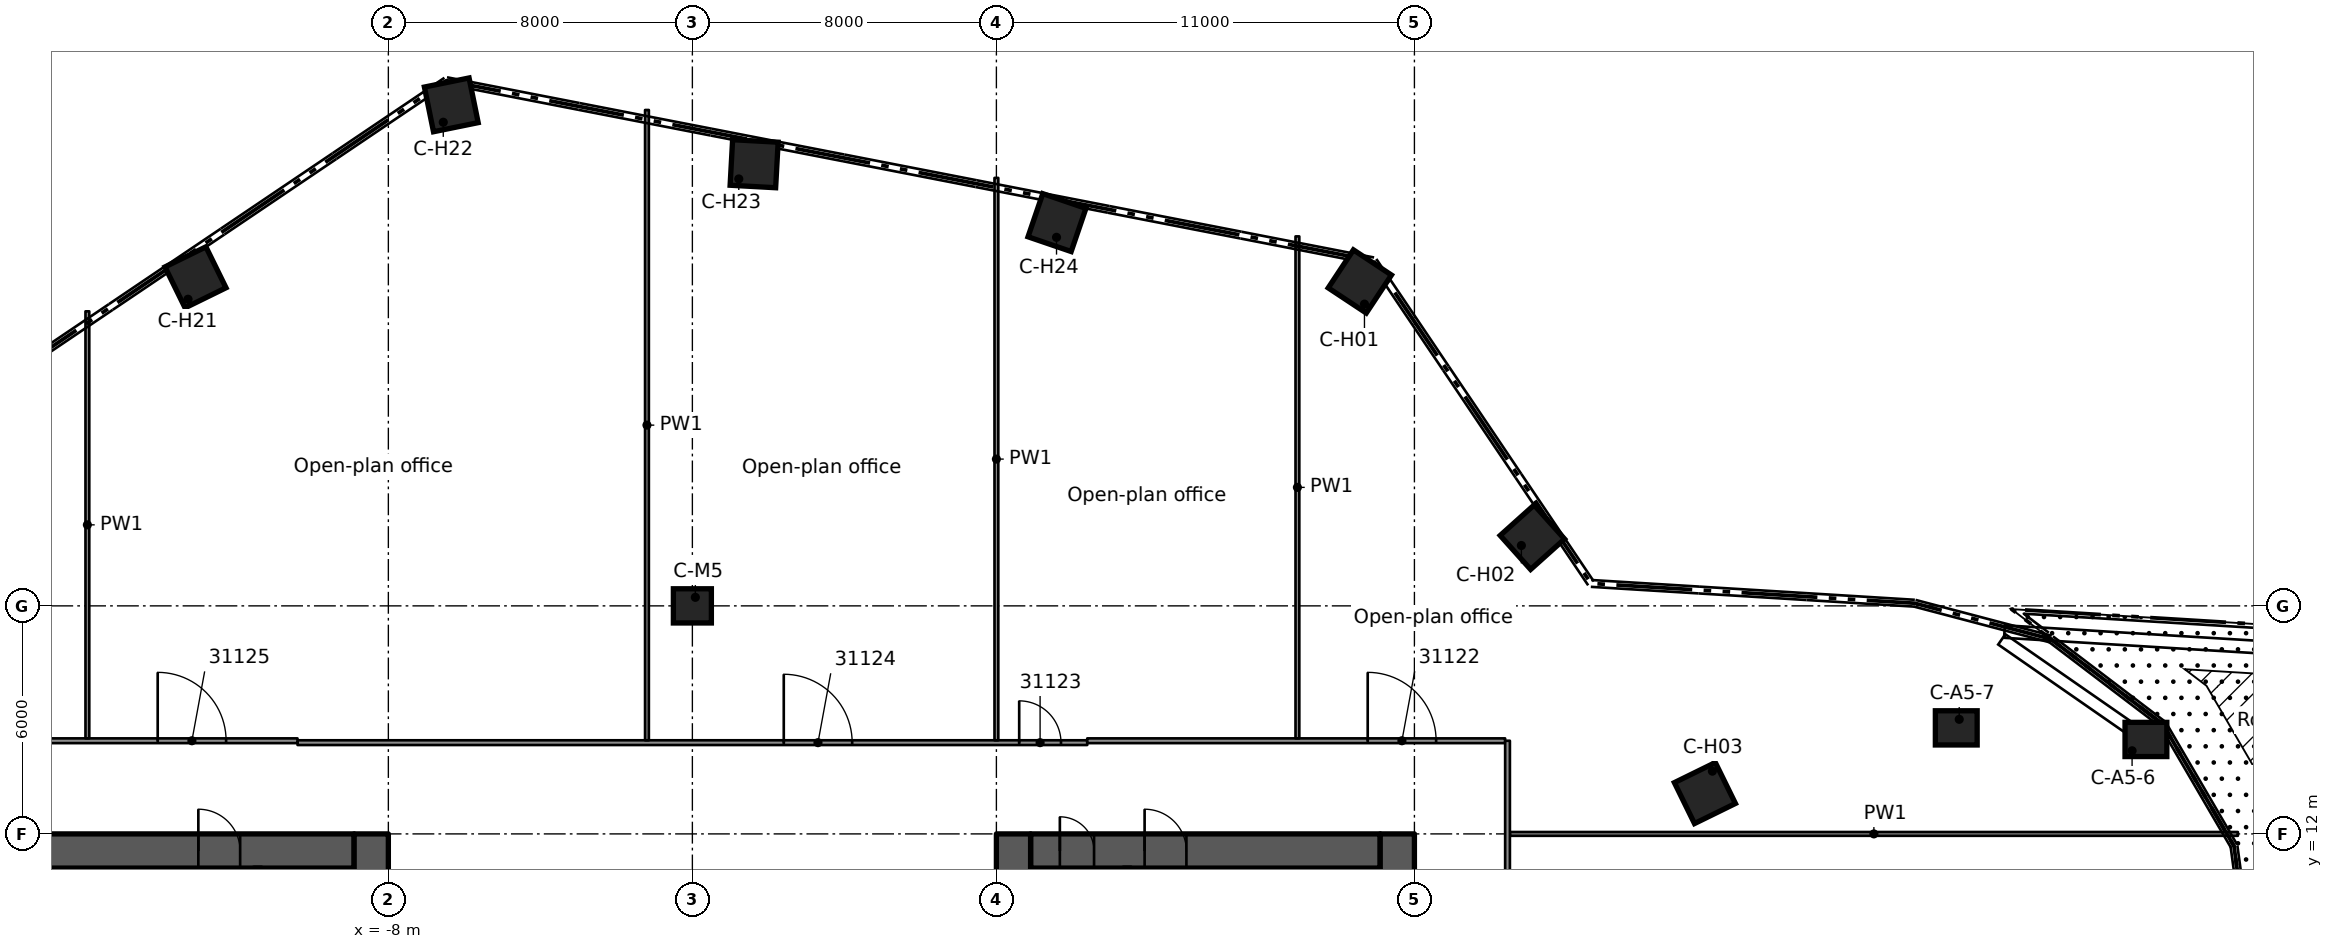
"""IFC4 building model, lengths in metres.
Left out: names, types, materials, properties, quantities, classifications, styles, units other than length and angle.
Written with IfcOpenShell. Run it as: python <this file> out.ifc"""

import sys

from ifc_helpers import new_model, si_unit, direction, frame, frame_2d, origin, origin_2d, place, context, subcontext, project, spatial, rectangle, extrude, element, fill, save


model = new_model("IFC4")
c1 = context("Model", 3, precision=1e-05, world=origin(), true_north=direction((0.0, 1.0)))
c2 = subcontext(c1, "Body", "Model", "MODEL_VIEW")
j1 = project(units=[si_unit("LENGTHUNIT", "METRE"), si_unit("PLANEANGLEUNIT", "RADIAN")], contexts=[c1])
p1 = place(None, origin())
s1 = spatial("IfcSite", under=j1, at=p1, CompositionType="ELEMENT")
p2 = place(p1, origin())
s2 = spatial("IfcBuilding", under=s1, at=p2, CompositionType="ELEMENT")
p3 = place(p2, frame((0.0, 0.0, 156.1)))
s3 = spatial("IfcBuildingStorey", under=s2, at=p3, CompositionType="ELEMENT", Elevation=156.1)
p4 = place(p3, frame((-18.1, 11.55, 0.0), z_axis=(0.0, 0.0, 1.0), x_axis=(1.0, 0.0, 0.0)))
e1 = element("IfcWall", 1, at=p4, inside=s3, PredefinedType="SHEAR", context=c2, shape_type="SweptSolid", body=[
    extrude(rectangle(XDim=9.2, YDim=0.9, at=frame_2d((4.6, 0.0))), origin(), (0.0, 0.0, 1.0), 3.5),
])
p5 = place(p4, frame((5.1, 0.0, 0.0)))
e2 = element("IfcOpeningElement", 2, at=p5, cuts=e1, PredefinedType="OPENING", context=c2, shape_type="SweptSolid", body=[
    extrude(rectangle(XDim=1.1, YDim=2.1, at=frame_2d((0.55, 1.05))), frame((0.0, 0.46, 0.0), z_axis=(0.0, -1.0, 0.0), x_axis=(1.0, 0.0, 0.0)), (0.0, 0.0, 1.0), 0.92),
])
p6 = place(p3, frame((-8.45, -12.0, 0.0), z_axis=(0.0, 0.0, 1.0), x_axis=(0.0, 1.0, 0.0)))
e3 = element("IfcWall", 3, at=p6, inside=s3, PredefinedType="SHEAR", context=c2, shape_type="SweptSolid", body=[
    extrude(rectangle(XDim=24.0, YDim=0.9, at=frame_2d((12.0, 0.0))), origin(), (0.0, 0.0, 1.0), 3.5),
])
p7 = place(p6, frame((9.6, 0.0, 0.0)))
e4 = element("IfcOpeningElement", 4, at=p7, cuts=e3, PredefinedType="OPENING", context=c2, shape_type="SweptSolid", body=[
    extrude(rectangle(XDim=1.8, YDim=2.1, at=frame_2d((0.9, 1.05))), frame((0.0, 0.46, 0.0), z_axis=(0.0, -1.0, 0.0), x_axis=(1.0, 0.0, 0.0)), (0.0, 0.0, 1.0), 0.92),
])
p8 = place(p6, frame((19.65, 0.0, 0.0)))
e5 = element("IfcOpeningElement", 5, at=p8, cuts=e3, PredefinedType="OPENING", context=c2, shape_type="SweptSolid", body=[
    extrude(rectangle(XDim=1.1, YDim=2.1, at=frame_2d((0.55, 1.05))), frame((0.0, 0.46, 0.0), z_axis=(0.0, -1.0, 0.0), x_axis=(1.0, 0.0, 0.0)), (0.0, 0.0, 1.0), 0.92),
])
p9 = place(p6, frame((2.2, 0.0, 0.0)))
e6 = element("IfcOpeningElement", 6, at=p9, cuts=e3, PredefinedType="OPENING", context=c2, shape_type="SweptSolid", body=[
    extrude(rectangle(XDim=0.8, YDim=2.1, at=frame_2d((0.4, 1.05))), frame((0.0, 0.46, 0.0), z_axis=(0.0, -1.0, 0.0), x_axis=(1.0, 0.0, 0.0)), (0.0, 0.0, 1.0), 0.92),
])
p10 = place(p3, frame((8.9, 11.55, 0.0), z_axis=(0.0, 0.0, 1.0), x_axis=(1.0, 0.0, 0.0)))
e7 = element("IfcWall", 7, at=p10, inside=s3, PredefinedType="SHEAR", context=c2, shape_type="SweptSolid", body=[
    extrude(rectangle(XDim=9.2, YDim=0.9, at=frame_2d((4.6, 0.0))), origin(), (0.0, 0.0, 1.0), 3.5),
])
p11 = place(p10, frame((3.0, 0.0, 0.0)))
e8 = element("IfcOpeningElement", 8, at=p11, cuts=e7, PredefinedType="OPENING", context=c2, shape_type="SweptSolid", body=[
    extrude(rectangle(XDim=1.1, YDim=2.1, at=frame_2d((0.55, 1.05))), frame((0.0, 0.46, 0.0), z_axis=(0.0, -1.0, 0.0), x_axis=(1.0, 0.0, 0.0)), (0.0, 0.0, 1.0), 0.92),
])
p12 = place(p10, frame((0.77, 0.0, 0.0)))
e9 = element("IfcOpeningElement", 9, at=p12, cuts=e7, PredefinedType="OPENING", context=c2, shape_type="SweptSolid", body=[
    extrude(rectangle(XDim=0.9, YDim=2.1, at=frame_2d((0.45, 1.05))), frame((0.0, 0.46, 0.0), z_axis=(0.0, -1.0, 0.0), x_axis=(1.0, 0.0, 0.0)), (0.0, 0.0, 1.0), 0.92),
])
p13 = place(p3, frame((8.45, -12.0, 0.0), z_axis=(0.0, 0.0, 1.0), x_axis=(0.0, 1.0, 0.0)))
e10 = element("IfcWall", 10, at=p13, inside=s3, PredefinedType="SHEAR", context=c2, shape_type="SweptSolid", body=[
    extrude(rectangle(XDim=24.0, YDim=0.9, at=frame_2d((12.0, 0.0))), origin(), (0.0, 0.0, 1.0), 3.5),
])
p14 = place(p13, frame((12.6, 0.0, 0.0)))
e11 = element("IfcOpeningElement", 11, at=p14, cuts=e10, PredefinedType="OPENING", context=c2, shape_type="SweptSolid", body=[
    extrude(rectangle(XDim=1.8, YDim=2.1, at=frame_2d((0.9, 1.05))), frame((0.0, 0.46, 0.0), z_axis=(0.0, -1.0, 0.0), x_axis=(1.0, 0.0, 0.0)), (0.0, 0.0, 1.0), 0.92),
])
p15 = place(p13, frame((3.25, 0.0, 0.0)))
e12 = element("IfcOpeningElement", 12, at=p15, cuts=e10, PredefinedType="OPENING", context=c2, shape_type="SweptSolid", body=[
    extrude(rectangle(XDim=1.1, YDim=2.1, at=frame_2d((0.55, 1.05))), frame((0.0, 0.46, 0.0), z_axis=(0.0, -1.0, 0.0), x_axis=(1.0, 0.0, 0.0)), (0.0, 0.0, 1.0), 0.92),
])
p16 = place(p13, frame((21.0, 0.0, 0.0)))
e13 = element("IfcOpeningElement", 13, at=p16, cuts=e10, PredefinedType="OPENING", context=c2, shape_type="SweptSolid", body=[
    extrude(rectangle(XDim=0.8, YDim=2.1, at=frame_2d((0.4, 1.05))), frame((0.0, 0.46, 0.0), z_axis=(0.0, -1.0, 0.0), x_axis=(1.0, 0.0, 0.0)), (0.0, 0.0, 1.0), 0.92),
])
p17 = place(p3, frame((18.55, -12.0, 0.0), z_axis=(0.0, 0.0, 1.0), x_axis=(0.0, 1.0, 0.0)))
e14 = element("IfcWall", 14, at=p17, inside=s3, PredefinedType="SHEAR", context=c2, shape_type="SweptSolid", body=[
    extrude(rectangle(XDim=24.0, YDim=0.9, at=frame_2d((12.0, 0.0))), origin(), (0.0, 0.0, 1.0), 3.5),
])
p18 = place(p17, frame((12.1, 0.0, 0.0)))
e15 = element("IfcOpeningElement", 15, at=p18, cuts=e14, PredefinedType="OPENING", context=c2, shape_type="SweptSolid", body=[
    extrude(rectangle(XDim=1.8, YDim=2.1, at=frame_2d((0.9, 1.05))), frame((0.0, 0.46, 0.0), z_axis=(0.0, -1.0, 0.0), x_axis=(1.0, 0.0, 0.0)), (0.0, 0.0, 1.0), 0.92),
])
for number, where, z_axis, x_axis in (
    (16, (38.249, 14.485, 0.0), (0.0, 0.0, 1.0), (1.0, 0.0, 0.0)),
    (17, (33.258, 14.79, 0.0), (0.0, 0.0, 1.0), (1.0, 0.0, 0.0)),
):
    element("IfcColumn", number, at=place(p3, frame(where, z_axis=z_axis, x_axis=x_axis)), inside=s3, PredefinedType="COLUMN", context=c2, shape_type="SweptSolid", body=[
        extrude(rectangle(XDim=1.1, YDim=0.9, at=origin_2d()), origin(), (0.0, 0.0, 1.0), 3.5),
    ])
for number, where, z_axis, x_axis in (
    (18, (17.564, 26.536, 0.0), (0.0, 0.0, 1.0), (0.552, 0.834, 0.0)),
    (19, (22.104, 19.806, 0.0), (0.0, 0.0, 1.0), (0.745, 0.667, 0.0)),
    (20, (26.644, 13.075, 0.0), (0.0, 0.0, 1.0), (0.898, 0.441, 0.0)),
    (21, (-13.075, 26.644, 0.0), (0.0, 0.0, 1.0), (-0.441, 0.898, 0.0)),
    (22, (-6.344, 31.183, 0.0), (0.0, 0.0, 1.0), (-0.199, 0.98, 0.0)),
    (23, (1.625, 29.634, 0.0), (0.0, 0.0, 1.0), (0.055, 0.998, 0.0)),
    (24, (9.594, 28.085, 0.0), (0.0, 0.0, 1.0), (0.323, 0.946, 0.0)),
):
    element("IfcColumn", number, at=place(p3, frame(where, z_axis=z_axis, x_axis=x_axis)), inside=s3, PredefinedType="COLUMN", context=c2, shape_type="SweptSolid", body=[
        extrude(rectangle(XDim=1.2, YDim=1.2, at=origin_2d()), origin(), (0.0, 0.0, 1.0), 3.5),
    ])
p19 = place(p3, frame((0.0, 18.0, 0.0), z_axis=(0.0, 0.0, 1.0), x_axis=(1.0, 0.0, 0.0)))
e25 = element("IfcColumn", 25, at=p19, inside=s3, PredefinedType="COLUMN", context=c2, shape_type="SweptSolid", body=[
    extrude(rectangle(XDim=1.0, YDim=0.9, at=origin_2d()), origin(), (0.0, 0.0, 1.0), 3.5),
])
p20 = place(p3, frame((-11.44, 6.975, 0.0), z_axis=(0.0, 0.0, 1.0), x_axis=(0.0, 1.0, 0.0)))
e26 = element("IfcWall", 26, at=p20, inside=s3, PredefinedType="SOLIDWALL", context=c2, shape_type="SweptSolid", body=[
    extrude(rectangle(XDim=4.125, YDim=0.2, at=frame_2d((2.062, 0.0))), origin(), (0.0, 0.0, 1.0), 3.09),
])
p21 = place(p20, frame((2.1, 0.0, 0.0)))
e27 = element("IfcOpeningElement", 27, at=p21, cuts=e26, PredefinedType="OPENING", context=c2, shape_type="SweptSolid", body=[
    extrude(rectangle(XDim=1.1, YDim=2.1, at=frame_2d((0.55, 1.05))), frame((0.0, 0.11, 0.0), z_axis=(0.0, -1.0, 0.0), x_axis=(1.0, 0.0, 0.0)), (0.0, 0.0, 1.0), 0.22),
])
p22 = place(p3, frame((11.44, 11.1, 0.0), z_axis=(0.0, 0.0, 1.0), x_axis=(0.0, -1.0, 0.0)))
e28 = element("IfcWall", 28, at=p22, inside=s3, PredefinedType="SOLIDWALL", context=c2, shape_type="SweptSolid", body=[
    extrude(rectangle(XDim=4.125, YDim=0.2, at=frame_2d((2.062, 0.0))), origin(), (0.0, 0.0, 1.0), 3.09),
])
p23 = place(p3, frame((21.512, 12.0, 0.0), z_axis=(0.0, 0.0, 1.0), x_axis=(1.0, 0.0, 0.0)))
e29 = element("IfcWall", 29, at=p23, inside=s3, PredefinedType="PARTITIONING", context=c2, shape_type="SweptSolid", body=[
    extrude(rectangle(XDim=19.157, YDim=0.1, at=frame_2d((9.579, 0.0))), origin(), (0.0, 0.0, 1.0), 3.08),
])
p24 = place(p3, frame((-10.39, 14.401, 0.0), z_axis=(0.0, 0.0, 1.0), x_axis=(1.0, 0.0, 0.0)))
e30 = element("IfcWall", 30, at=p24, inside=s3, PredefinedType="PARTITIONING", context=c2, shape_type="SweptSolid", body=[
    extrude(rectangle(XDim=20.781, YDim=0.125, at=frame_2d((10.391, 0.0))), origin(), (0.0, 0.0, 1.0), 3.08),
])
p25 = place(p24, frame((18.99, 0.0, 0.0)))
e31 = element("IfcOpeningElement", 31, at=p25, cuts=e30, PredefinedType="OPENING", context=c2, shape_type="SweptSolid", body=[
    extrude(rectangle(XDim=1.1, YDim=2.1, at=frame_2d((0.55, 1.05))), frame((0.0, 0.073, 0.0), z_axis=(0.0, -1.0, 0.0), x_axis=(1.0, 0.0, 0.0)), (0.0, 0.0, 1.0), 0.145),
])
p26 = place(p24, frame((12.795, 0.0, 0.0)))
e32 = element("IfcOpeningElement", 32, at=p26, cuts=e30, PredefinedType="OPENING", context=c2, shape_type="SweptSolid", body=[
    extrude(rectangle(XDim=1.8, YDim=2.1, at=frame_2d((0.9, 1.05))), frame((0.0, 0.073, 0.0), z_axis=(0.0, -1.0, 0.0), x_axis=(1.0, 0.0, 0.0)), (0.0, 0.0, 1.0), 0.145),
])
p27 = place(p3, frame((-21.387, 14.451, 0.0), z_axis=(0.0, 0.0, 1.0), x_axis=(1.0, 0.0, 0.0)))
e33 = element("IfcWall", 33, at=p27, inside=s3, PredefinedType="PARTITIONING", context=c2, shape_type="SweptSolid", body=[
    extrude(rectangle(XDim=10.996, YDim=0.125, at=frame_2d((5.498, 0.0))), origin(), (0.0, 0.0, 1.0), 3.08),
])
p28 = place(p27, frame((7.317, 0.0, 0.0)))
e34 = element("IfcOpeningElement", 34, at=p28, cuts=e33, PredefinedType="OPENING", context=c2, shape_type="SweptSolid", body=[
    extrude(rectangle(XDim=1.8, YDim=2.1, at=frame_2d((0.9, 1.05))), frame((0.0, 0.073, 0.0), z_axis=(0.0, -1.0, 0.0), x_axis=(1.0, 0.0, 0.0)), (0.0, 0.0, 1.0), 0.145),
])
p29 = place(p3, frame((10.391, 14.451, 0.0), z_axis=(0.0, 0.0, 1.0), x_axis=(1.0, 0.0, 0.0)))
e35 = element("IfcWall", 35, at=p29, inside=s3, PredefinedType="PARTITIONING", context=c2, shape_type="SweptSolid", body=[
    extrude(rectangle(XDim=10.996, YDim=0.125, at=frame_2d((5.498, 0.0))), origin(), (0.0, 0.0, 1.0), 3.08),
])
p30 = place(p29, frame((7.38, 0.0, 0.0)))
e36 = element("IfcOpeningElement", 36, at=p30, cuts=e35, PredefinedType="OPENING", context=c2, shape_type="SweptSolid", body=[
    extrude(rectangle(XDim=1.8, YDim=2.1, at=frame_2d((0.9, 1.05))), frame((0.0, 0.073, 0.0), z_axis=(0.0, -1.0, 0.0), x_axis=(1.0, 0.0, 0.0)), (0.0, 0.0, 1.0), 0.145),
])
p31 = place(p3, frame((21.45, 14.451, 0.0), z_axis=(0.0, 0.0, 1.0), x_axis=(0.0, -1.0, 0.0)))
e37 = element("IfcWall", 37, at=p31, inside=s3, PredefinedType="PARTITIONING", context=c2, shape_type="SweptSolid", body=[
    extrude(rectangle(XDim=28.902, YDim=0.125, at=frame_2d((14.451, 0.0))), origin(), (0.0, 0.0, 1.0), 3.08),
])
p32 = place(p31, frame((25.137, 0.0, 0.0)))
e38 = element("IfcOpeningElement", 38, at=p32, cuts=e37, PredefinedType="OPENING", context=c2, shape_type="SweptSolid", body=[
    extrude(rectangle(XDim=0.9, YDim=2.1, at=frame_2d((0.45, 1.05))), frame((0.0, 0.073, 0.0), z_axis=(0.0, -1.0, 0.0), x_axis=(1.0, 0.0, 0.0)), (0.0, 0.0, 1.0), 0.145),
])
p33 = place(p31, frame((18.025, 0.0, 0.0)))
e39 = element("IfcOpeningElement", 39, at=p33, cuts=e37, PredefinedType="OPENING", context=c2, shape_type="SweptSolid", body=[
    extrude(rectangle(XDim=1.8, YDim=2.1, at=frame_2d((0.9, 1.05))), frame((0.0, 0.073, 0.0), z_axis=(0.0, -1.0, 0.0), x_axis=(1.0, 0.0, 0.0)), (0.0, 0.0, 1.0), 0.145),
])
p34 = place(p31, frame((11.413, 0.0, 0.0)))
e40 = element("IfcOpeningElement", 40, at=p34, cuts=e37, PredefinedType="OPENING", context=c2, shape_type="SweptSolid", body=[
    extrude(rectangle(XDim=1.8, YDim=2.1, at=frame_2d((0.9, 1.05))), frame((0.0, 0.073, 0.0), z_axis=(0.0, -1.0, 0.0), x_axis=(1.0, 0.0, 0.0)), (0.0, 0.0, 1.0), 0.145),
])
p35 = place(p31, frame((4.801, 0.0, 0.0)))
e41 = element("IfcOpeningElement", 41, at=p35, cuts=e37, PredefinedType="OPENING", context=c2, shape_type="SweptSolid", body=[
    extrude(rectangle(XDim=1.8, YDim=2.1, at=frame_2d((0.9, 1.05))), frame((0.0, 0.073, 0.0), z_axis=(0.0, -1.0, 0.0), x_axis=(1.0, 0.0, 0.0)), (0.0, 0.0, 1.0), 0.145),
])
p36 = place(p3, frame((15.921, 14.514, 0.0), z_axis=(0.0, 0.0, 1.0), x_axis=(0.0, 1.0, 0.0)))
e42 = element("IfcWall", 42, at=p36, inside=s3, PredefinedType="PARTITIONING", context=c2, shape_type="SweptSolid", body=[
    extrude(rectangle(XDim=13.208, YDim=0.1, at=frame_2d((6.604, 0.0))), origin(), (0.0, 0.0, 1.0), 3.08),
])
p37 = place(p3, frame((8.0, 14.463, 0.0), z_axis=(0.0, 0.0, 1.0), x_axis=(0.0, 1.0, 0.0)))
e43 = element("IfcWall", 43, at=p37, inside=s3, PredefinedType="PARTITIONING", context=c2, shape_type="SweptSolid", body=[
    extrude(rectangle(XDim=14.798, YDim=0.1, at=frame_2d((7.399, 0.0))), origin(), (0.0, 0.0, 1.0), 3.08),
])
p38 = place(p3, frame((-1.195, 14.463, 0.0), z_axis=(0.0, 0.0, 1.0), x_axis=(0.0, 1.0, 0.0)))
e44 = element("IfcWall", 44, at=p38, inside=s3, PredefinedType="PARTITIONING", context=c2, shape_type="SweptSolid", body=[
    extrude(rectangle(XDim=16.585, YDim=0.1, at=frame_2d((8.292, 0.0))), origin(), (0.0, 0.0, 1.0), 3.08),
])
p39 = place(p3, frame((-15.92, 14.514, 0.0), z_axis=(0.0, 0.0, 1.0), x_axis=(0.0, 1.0, 0.0)))
e45 = element("IfcWall", 45, at=p39, inside=s3, PredefinedType="PARTITIONING", context=c2, shape_type="SweptSolid", body=[
    extrude(rectangle(XDim=11.236, YDim=0.1, at=frame_2d((5.618, 0.0))), origin(), (0.0, 0.0, 1.0), 3.08),
])
p40 = place(p5, origin())
e46 = element("IfcDoor", 46, at=p40, inside=s3, OperationType="SINGLE_SWING_RIGHT", PredefinedType="DOOR", context=c2, shape_type="SweptSolid", body=[
    extrude(rectangle(XDim=1.1, YDim=2.1, at=frame_2d((0.55, 1.05))), frame((0.0, 0.025, 0.0), z_axis=(0.0, -1.0, 0.0), x_axis=(1.0, 0.0, 0.0)), (0.0, 0.0, 1.0), 0.05),
])
fill(e2, e46)
p41 = place(p11, origin())
e47 = element("IfcDoor", 47, at=p41, inside=s3, OperationType="SINGLE_SWING_LEFT", PredefinedType="DOOR", context=c2, shape_type="SweptSolid", body=[
    extrude(rectangle(XDim=1.1, YDim=2.1, at=frame_2d((0.55, 1.05))), frame((0.0, 0.025, 0.0), z_axis=(0.0, -1.0, 0.0), x_axis=(1.0, 0.0, 0.0)), (0.0, 0.0, 1.0), 0.05),
])
fill(e8, e47)
p42 = place(p12, origin())
e48 = element("IfcDoor", 48, at=p42, inside=s3, OperationType="SINGLE_SWING_LEFT", PredefinedType="DOOR", context=c2, shape_type="SweptSolid", body=[
    extrude(rectangle(XDim=0.9, YDim=2.1, at=frame_2d((0.45, 1.05))), frame((0.0, 0.025, 0.0), z_axis=(0.0, -1.0, 0.0), x_axis=(1.0, 0.0, 0.0)), (0.0, 0.0, 1.0), 0.05),
])
fill(e9, e48)
p43 = place(p30, origin())
e49 = element("IfcDoor", 49, at=p43, inside=s3, OperationType="DOUBLE_DOOR_SINGLE_SWING", PredefinedType="DOOR", context=c2, shape_type="SweptSolid", body=[
    extrude(rectangle(XDim=1.8, YDim=2.1, at=frame_2d((0.9, 1.05))), frame((0.0, 0.025, 0.0), z_axis=(0.0, -1.0, 0.0), x_axis=(1.0, 0.0, 0.0)), (0.0, 0.0, 1.0), 0.05),
])
fill(e36, e49)
p44 = place(p25, origin())
e50 = element("IfcDoor", 50, at=p44, inside=s3, OperationType="SINGLE_SWING_RIGHT", PredefinedType="DOOR", context=c2, shape_type="SweptSolid", body=[
    extrude(rectangle(XDim=1.1, YDim=2.1, at=frame_2d((0.55, 1.05))), frame((0.0, 0.025, 0.0), z_axis=(0.0, -1.0, 0.0), x_axis=(1.0, 0.0, 0.0)), (0.0, 0.0, 1.0), 0.05),
])
fill(e31, e50)
p45 = place(p26, origin())
e51 = element("IfcDoor", 51, at=p45, inside=s3, OperationType="DOUBLE_DOOR_SINGLE_SWING", PredefinedType="DOOR", context=c2, shape_type="SweptSolid", body=[
    extrude(rectangle(XDim=1.8, YDim=2.1, at=frame_2d((0.9, 1.05))), frame((0.0, 0.025, 0.0), z_axis=(0.0, -1.0, 0.0), x_axis=(1.0, 0.0, 0.0)), (0.0, 0.0, 1.0), 0.05),
])
fill(e32, e51)
p46 = place(p28, origin())
e52 = element("IfcDoor", 52, at=p46, inside=s3, OperationType="DOUBLE_DOOR_SINGLE_SWING", PredefinedType="DOOR", context=c2, shape_type="SweptSolid", body=[
    extrude(rectangle(XDim=1.8, YDim=2.1, at=frame_2d((0.9, 1.05))), frame((0.0, 0.025, 0.0), z_axis=(0.0, -1.0, 0.0), x_axis=(1.0, 0.0, 0.0)), (0.0, 0.0, 1.0), 0.05),
])
fill(e34, e52)
save(model, sys.argv[1])
